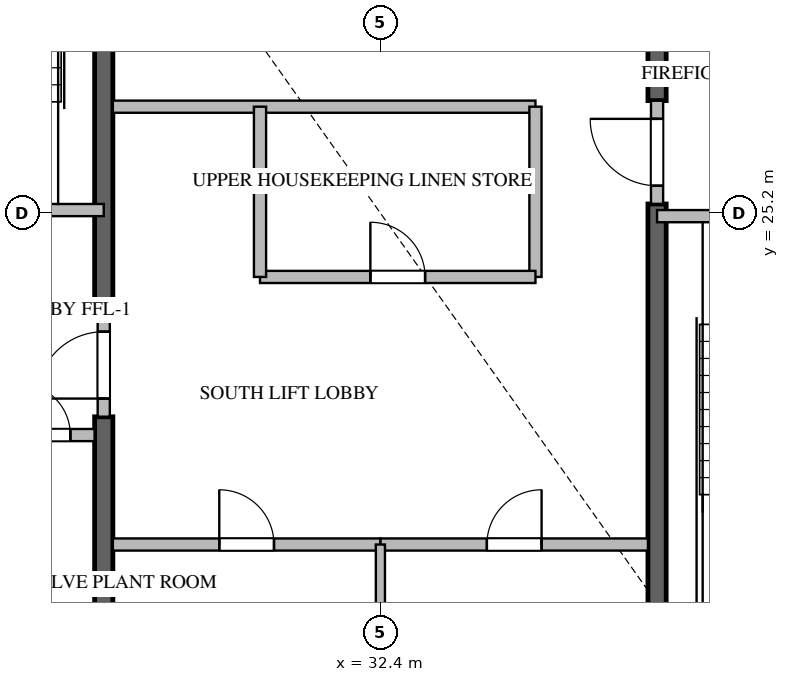
"""IFC4 building model, lengths in metres.
Left out: names, types, materials, properties, quantities, classifications, styles, units other than length and angle.
Written with IfcOpenShell. Run it as: python <this file> out.ifc"""

import sys

from ifc_helpers import new_model, si_unit, direction, frame, frame_2d, origin, place, context, subcontext, project, spatial, rectangle, extrude, source, transform, mapped, element, fill, save


model = new_model("IFC4")
c1 = context("Model", 3, precision=1e-05, world=origin(), true_north=direction((0.0, 1.0)))
c2 = subcontext(c1, "Body", "Model", "MODEL_VIEW")
j1 = project(units=[si_unit("LENGTHUNIT", "METRE"), si_unit("PLANEANGLEUNIT", "RADIAN")], contexts=[c1])
p1 = place(None, origin())
s1 = spatial("IfcSite", under=j1, at=p1, CompositionType="ELEMENT")
p2 = place(p1, origin())
s2 = spatial("IfcBuilding", under=s1, at=p2, CompositionType="ELEMENT")
p3 = place(p2, frame((0.0, 0.0, 256.65)))
s3 = spatial("IfcBuildingStorey", under=s2, at=p3, CompositionType="ELEMENT", Elevation=256.65)
p4 = place(p3, frame((27.85, 16.975, -0.26), z_axis=(0.0, 0.0, 1.0), x_axis=(0.0, 1.0, 0.0)))
e1 = element("IfcWall", 1, at=p4, inside=s3, PredefinedType="SHEAR", context=c2, shape_type="SweptSolid", body=[
    extrude(rectangle(XDim=4.875, YDim=0.3, at=frame_2d((2.438, 0.0))), origin(), (0.0, 0.0, 1.0), 3.848),
])
p5 = place(p3, frame((27.85, 23.55, -0.26), z_axis=(0.0, 0.0, 1.0), x_axis=(0.0, 1.0, 0.0)))
e2 = element("IfcWall", 2, at=p5, inside=s3, PredefinedType="SHEAR", context=c2, shape_type="SweptSolid", body=[
    extrude(rectangle(XDim=9.875, YDim=0.3, at=frame_2d((4.938, 0.0))), origin(), (0.0, 0.0, 1.0), 3.848),
])
p6 = place(p3, frame((36.95, 16.975, -0.26), z_axis=(0.0, 0.0, 1.0), x_axis=(0.0, 1.0, 0.0)))
e3 = element("IfcWall", 3, at=p6, inside=s3, PredefinedType="SHEAR", context=c2, shape_type="SweptSolid", body=[
    extrude(rectangle(XDim=8.375, YDim=0.3, at=frame_2d((4.188, 0.0))), origin(), (0.0, 0.0, 1.0), 3.848),
])
p7 = place(p3, frame((36.95, 27.05, -0.26), z_axis=(0.0, 0.0, 1.0), x_axis=(0.0, 1.0, 0.0)))
e4 = element("IfcWall", 4, at=p7, inside=s3, PredefinedType="SHEAR", context=c2, shape_type="SweptSolid", body=[
    extrude(rectangle(XDim=6.375, YDim=0.3, at=frame_2d((3.188, 0.0))), origin(), (0.0, 0.0, 1.0), 3.848),
])
p8 = place(p3, frame((23.4, 25.25, 0.0), z_axis=(0.0, 0.0, 1.0), x_axis=(1.0, 0.0, 0.0)))
e5 = element("IfcWall", 5, at=p8, inside=s3, PredefinedType="STANDARD", context=c2, shape_type="SweptSolid", body=[
    extrude(rectangle(XDim=4.45, YDim=0.2, at=frame_2d((2.225, 0.0))), origin(), (0.0, 0.0, 1.0), 3.59),
])
p9 = place(p8, frame((1.65, 0.0, 0.0)))
e6 = element("IfcOpeningElement", 6, at=p9, cuts=e5, PredefinedType="OPENING", context=c2, shape_type="SweptSolid", body=[
    extrude(rectangle(XDim=1.1, YDim=2.15, at=frame_2d((0.55, 1.075))), frame((0.0, 0.11, 0.0), z_axis=(0.0, -1.0, 0.0), x_axis=(1.0, 0.0, 0.0)), (0.0, 0.0, 1.0), 0.22),
])
p10 = place(p3, frame((36.95, 25.15, 0.0), z_axis=(0.0, 0.0, 1.0), x_axis=(1.0, 0.0, 0.0)))
e7 = element("IfcWall", 7, at=p10, inside=s3, PredefinedType="STANDARD", context=c2, shape_type="SweptSolid", body=[
    extrude(rectangle(XDim=4.45, YDim=0.2, at=frame_2d((2.225, 0.0))), origin(), (0.0, 0.0, 1.0), 3.59),
])
p11 = place(p10, frame((1.65, 0.0, 0.0)))
e8 = element("IfcOpeningElement", 8, at=p11, cuts=e7, PredefinedType="OPENING", context=c2, shape_type="SweptSolid", body=[
    extrude(rectangle(XDim=1.1, YDim=2.15, at=frame_2d((0.55, 1.075))), frame((0.0, 0.11, 0.0), z_axis=(0.0, -1.0, 0.0), x_axis=(1.0, 0.0, 0.0)), (0.0, 0.0, 1.0), 0.22),
])
p12 = place(p3, frame((26.052, 21.55, 0.0), z_axis=(0.0, 0.0, 1.0), x_axis=(1.0, 0.0, 0.0)))
e9 = element("IfcWall", 9, at=p12, inside=s3, PredefinedType="STANDARD", context=c2, shape_type="SweptSolid", body=[
    extrude(rectangle(XDim=1.648, YDim=0.2, at=frame_2d((0.824, 0.0))), origin(), (0.0, 0.0, 1.0), 3.59),
])
p13 = place(p12, frame((0.399, 0.0, 0.0)))
e10 = element("IfcOpeningElement", 10, at=p13, cuts=e9, PredefinedType="OPENING", context=c2, shape_type="SweptSolid", body=[
    extrude(rectangle(XDim=0.85, YDim=2.1, at=frame_2d((0.425, 1.05))), frame((0.0, 0.11, 0.0), z_axis=(0.0, -1.0, 0.0), x_axis=(1.0, 0.0, 0.0)), (0.0, 0.0, 1.0), 0.22),
])
p14 = place(p3, frame((27.85, 21.852, 0.0), z_axis=(0.0, 0.0, 1.0), x_axis=(0.0, 1.0, 0.0)))
e11 = element("IfcWall", 11, at=p14, inside=s3, PredefinedType="STANDARD", context=c2, shape_type="SweptSolid", body=[
    extrude(rectangle(XDim=1.696, YDim=0.2, at=frame_2d((0.848, 0.0))), origin(), (0.0, 0.0, 1.0), 3.59),
])
p15 = place(p14, frame((0.298, 0.0, 0.0)))
e12 = element("IfcOpeningElement", 12, at=p15, cuts=e11, PredefinedType="OPENING", context=c2, shape_type="SweptSolid", body=[
    extrude(rectangle(XDim=1.1, YDim=2.15, at=frame_2d((0.55, 1.075))), frame((0.0, 0.11, 0.0), z_axis=(0.0, -1.0, 0.0), x_axis=(1.0, 0.0, 0.0)), (0.0, 0.0, 1.0), 0.22),
])
p16 = place(p3, frame((36.95, 25.352, 0.0), z_axis=(0.0, 0.0, 1.0), x_axis=(0.0, 1.0, 0.0)))
e13 = element("IfcWall", 13, at=p16, inside=s3, PredefinedType="STANDARD", context=c2, shape_type="SweptSolid", body=[
    extrude(rectangle(XDim=1.696, YDim=0.2, at=frame_2d((0.848, 0.0))), origin(), (0.0, 0.0, 1.0), 3.59),
])
p17 = place(p16, frame((0.298, 0.0, 0.0)))
e14 = element("IfcOpeningElement", 14, at=p17, cuts=e13, PredefinedType="OPENING", context=c2, shape_type="SweptSolid", body=[
    extrude(rectangle(XDim=1.1, YDim=2.15, at=frame_2d((0.55, 1.075))), frame((0.0, 0.11, 0.0), z_axis=(0.0, -1.0, 0.0), x_axis=(1.0, 0.0, 0.0)), (0.0, 0.0, 1.0), 0.22),
])
p18 = place(p3, frame((28.0, 19.75, 0.0), z_axis=(0.0, 0.0, 1.0), x_axis=(1.0, 0.0, 0.0)))
e15 = element("IfcWall", 15, at=p18, inside=s3, PredefinedType="STANDARD", context=c2, shape_type="SweptSolid", body=[
    extrude(rectangle(XDim=4.4, YDim=0.2, at=frame_2d((2.2, 0.0))), origin(), (0.0, 0.0, 1.0), 3.59),
])
p19 = place(p18, frame((1.75, 0.0, 0.0)))
e16 = element("IfcOpeningElement", 16, at=p19, cuts=e15, PredefinedType="OPENING", context=c2, shape_type="SweptSolid", body=[
    extrude(rectangle(XDim=0.9, YDim=2.1, at=frame_2d((0.45, 1.05))), frame((0.0, 0.11, 0.0), z_axis=(0.0, -1.0, 0.0), x_axis=(1.0, 0.0, 0.0)), (0.0, 0.0, 1.0), 0.22),
])
p20 = place(p3, frame((32.402, 19.75, 0.0), z_axis=(0.0, 0.0, 1.0), x_axis=(1.0, 0.0, 0.0)))
e17 = element("IfcWall", 17, at=p20, inside=s3, PredefinedType="STANDARD", context=c2, shape_type="SweptSolid", body=[
    extrude(rectangle(XDim=4.398, YDim=0.2, at=frame_2d((2.199, 0.0))), origin(), (0.0, 0.0, 1.0), 3.59),
])
p21 = place(p20, frame((1.749, 0.0, 0.0)))
e18 = element("IfcOpeningElement", 18, at=p21, cuts=e17, PredefinedType="OPENING", context=c2, shape_type="SweptSolid", body=[
    extrude(rectangle(XDim=0.9, YDim=2.1, at=frame_2d((0.45, 1.05))), frame((0.0, 0.11, 0.0), z_axis=(0.0, -1.0, 0.0), x_axis=(1.0, 0.0, 0.0)), (0.0, 0.0, 1.0), 0.22),
])
p22 = place(p3, frame((32.4, 17.02, 0.0), z_axis=(0.0, 0.0, 1.0), x_axis=(0.0, 1.0, 0.0)))
e19 = element("IfcWall", 19, at=p22, inside=s3, PredefinedType="PARTITIONING", context=c2, shape_type="SweptSolid", body=[
    extrude(rectangle(XDim=2.73, YDim=0.15, at=frame_2d((1.365, 0.0))), origin(), (0.0, 0.0, 1.0), 3.59),
])
p23 = place(p3, frame((28.0, 26.95, 0.0), z_axis=(0.0, 0.0, 1.0), x_axis=(1.0, 0.0, 0.0)))
e20 = element("IfcWall", 20, at=p23, inside=s3, PredefinedType="STANDARD", context=c2, shape_type="SweptSolid", body=[
    extrude(rectangle(XDim=6.95, YDim=0.2, at=frame_2d((3.475, 0.0))), origin(), (0.0, 0.0, 1.0), 3.59),
])
p24 = place(p3, frame((34.95, 24.15, 0.0), z_axis=(0.0, 0.0, 1.0), x_axis=(0.0, 1.0, 0.0)))
e21 = element("IfcWall", 21, at=p24, inside=s3, PredefinedType="STANDARD", context=c2, shape_type="SweptSolid", body=[
    extrude(rectangle(XDim=2.8, YDim=0.2, at=frame_2d((1.4, 0.0))), origin(), (0.0, 0.0, 1.0), 3.59),
])
p25 = place(p3, frame((30.42, 24.15, 0.0), z_axis=(0.0, 0.0, 1.0), x_axis=(1.0, 0.0, 0.0)))
e22 = element("IfcWall", 22, at=p25, inside=s3, PredefinedType="STANDARD", context=c2, shape_type="SweptSolid", body=[
    extrude(rectangle(XDim=4.53, YDim=0.2, at=frame_2d((2.265, 0.0))), origin(), (0.0, 0.0, 1.0), 3.59),
])
p26 = place(p25, frame((1.815, 0.0, 0.0)))
e23 = element("IfcOpeningElement", 23, at=p26, cuts=e22, PredefinedType="OPENING", context=c2, shape_type="SweptSolid", body=[
    extrude(rectangle(XDim=0.9, YDim=2.1, at=frame_2d((0.45, 1.05))), frame((0.0, 0.11, 0.0), z_axis=(0.0, -1.0, 0.0), x_axis=(1.0, 0.0, 0.0)), (0.0, 0.0, 1.0), 0.22),
])
p27 = place(p3, frame((30.42, 24.15, 0.0), z_axis=(0.0, 0.0, 1.0), x_axis=(0.0, 1.0, 0.0)))
e24 = element("IfcWall", 24, at=p27, inside=s3, PredefinedType="STANDARD", context=c2, shape_type="SweptSolid", body=[
    extrude(rectangle(XDim=2.8, YDim=0.2, at=frame_2d((1.4, 0.0))), origin(), (0.0, 0.0, 1.0), 3.59),
])
m1 = source(origin(), c2, "Body", "SweptSolid", [
    extrude(rectangle(XDim=0.85, YDim=2.1, at=frame_2d((0.425, 1.05))), frame((0.0, 0.025, 0.0), z_axis=(0.0, -1.0, 0.0), x_axis=(1.0, 0.0, 0.0)), (0.0, 0.0, 1.0), 0.05),
])
p28 = place(p13, origin())
e25 = element("IfcDoor", 25, at=p28, inside=s3, OperationType="SINGLE_SWING_LEFT", PredefinedType="DOOR", context=c2, shape_type="MappedRepresentation", body=[
    mapped(m1, transform((0.0, 0.0, 0.0), scale=1.0)),
])
fill(e10, e25)
m2 = source(origin(), c2, "Body", "SweptSolid", [
    extrude(rectangle(XDim=1.1, YDim=2.15, at=frame_2d((0.55, 1.075))), frame((0.0, 0.025, 0.0), z_axis=(0.0, -1.0, 0.0), x_axis=(1.0, 0.0, 0.0)), (0.0, 0.0, 1.0), 0.05),
])
p29 = place(p15, origin())
e26 = element("IfcDoor", 26, at=p29, inside=s3, OperationType="SINGLE_SWING_LEFT", PredefinedType="DOOR", context=c2, shape_type="MappedRepresentation", body=[
    mapped(m2, transform((0.0, 0.0, 0.0), scale=1.0)),
])
fill(e12, e26)
p30 = place(p17, origin())
e27 = element("IfcDoor", 27, at=p30, inside=s3, OperationType="SINGLE_SWING_RIGHT", PredefinedType="DOOR", context=c2, shape_type="MappedRepresentation", body=[
    mapped(m2, transform((0.0, 0.0, 0.0), scale=1.0)),
])
fill(e14, e27)
m3 = source(origin(), c2, "Body", "SweptSolid", [
    extrude(rectangle(XDim=0.9, YDim=2.1, at=frame_2d((0.45, 1.05))), frame((0.0, 0.025, 0.0), z_axis=(0.0, -1.0, 0.0), x_axis=(1.0, 0.0, 0.0)), (0.0, 0.0, 1.0), 0.05),
])
p31 = place(p19, origin())
e28 = element("IfcDoor", 28, at=p31, inside=s3, OperationType="SINGLE_SWING_LEFT", PredefinedType="DOOR", context=c2, shape_type="MappedRepresentation", body=[
    mapped(m3, transform((0.0, 0.0, 0.0), scale=1.0)),
])
fill(e16, e28)
p32 = place(p21, origin())
e29 = element("IfcDoor", 29, at=p32, inside=s3, OperationType="SINGLE_SWING_RIGHT", PredefinedType="DOOR", context=c2, shape_type="MappedRepresentation", body=[
    mapped(m3, transform((0.0, 0.0, 0.0), scale=1.0)),
])
fill(e18, e29)
p33 = place(p26, origin())
e30 = element("IfcDoor", 30, at=p33, inside=s3, OperationType="SINGLE_SWING_LEFT", PredefinedType="DOOR", context=c2, shape_type="MappedRepresentation", body=[
    mapped(m3, transform((0.0, 0.0, 0.0), scale=1.0)),
])
fill(e23, e30)
save(model, sys.argv[1])
